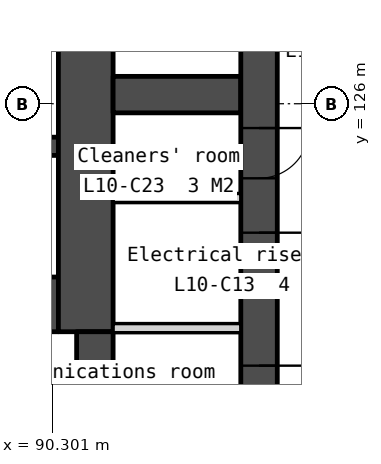
"""IFC4 building model, lengths in metres.
Left out: names, types, materials, properties, quantities, classifications, styles, units other than length and angle.
Written with IfcOpenShell. Run it as: python <this file> out.ifc"""

import sys

from ifc_helpers import new_model, si_unit, direction, frame, frame_2d, origin, place, context, subcontext, project, spatial, polyline, rectangle, outline, extrude, element, fill, save


model = new_model("IFC4")
c1 = context("Model", 3, precision=1e-05, world=origin(), true_north=direction((0.0, 1.0)))
c2 = subcontext(c1, "Body", "Model", "MODEL_VIEW")
j1 = project(units=[si_unit("LENGTHUNIT", "METRE"), si_unit("PLANEANGLEUNIT", "RADIAN")], contexts=[c1])
p1 = place(None, origin())
s1 = spatial("IfcSite", under=j1, at=p1, CompositionType="ELEMENT")
p2 = place(p1, origin())
s2 = spatial("IfcBuilding", under=s1, at=p2, CompositionType="ELEMENT")
p3 = place(p2, frame((0.0, 0.0, 49.0)))
s3 = spatial("IfcBuildingStorey", under=s2, at=p3, CompositionType="ELEMENT", Elevation=49.0)
p4 = place(p3, frame((87.85, 125.3, 0.0), z_axis=(0.0, 0.0, 1.0), x_axis=(1.0, 0.0, 0.0)))
e1 = element("IfcWall", 1, at=p4, inside=s3, PredefinedType="SOLIDWALL", context=c2, shape_type="SweptSolid", body=[
    extrude(rectangle(XDim=2.55, YDim=0.3, at=frame_2d((1.275, 0.0))), origin(), (0.0, 0.0, 1.0), 3.35),
])
p5 = place(p3, frame((87.85, 122.7, 0.0), z_axis=(0.0, 0.0, 1.0), x_axis=(1.0, 0.0, 0.0)))
e2 = element("IfcWall", 2, at=p5, inside=s3, PredefinedType="SOLIDWALL", context=c2, shape_type="SweptSolid", body=[
    extrude(rectangle(XDim=2.55, YDim=0.9, at=frame_2d((1.275, 0.0))), origin(), (0.0, 0.0, 1.0), 3.35),
])
p6 = place(p3, frame((90.85, 133.95, 0.0), z_axis=(0.0, 0.0, 1.0), x_axis=(0.0, -1.0, 0.0)))
e3 = element("IfcWall", 3, at=p6, inside=s3, PredefinedType="SOLIDWALL", context=c2, shape_type="SweptSolid", body=[
    extrude(rectangle(XDim=11.7, YDim=0.9, at=frame_2d((5.85, 0.0))), origin(), (0.0, 0.0, 1.0), 3.35),
])
p7 = place(p3, frame((91.0, 122.25, 0.0), z_axis=(0.0, 0.0, 1.0), x_axis=(0.0, -1.0, 0.0)))
e4 = element("IfcWall", 4, at=p7, inside=s3, PredefinedType="SOLIDWALL", context=c2, shape_type="SweptSolid", body=[
    extrude(rectangle(XDim=2.1, YDim=0.6, at=frame_2d((1.05, 0.0))), origin(), (0.0, 0.0, 1.0), 3.35),
])
p8 = place(p3, frame((91.3, 126.15, 0.0), z_axis=(0.0, 0.0, 1.0), x_axis=(1.0, 0.0, 0.0)))
e5 = element("IfcWall", 5, at=p8, inside=s3, PredefinedType="SOLIDWALL", context=c2, shape_type="SweptSolid", body=[
    extrude(rectangle(XDim=2.1, YDim=0.6, at=frame_2d((1.05, 0.0))), origin(), (0.0, 0.0, 1.0), 3.35),
])
for number, where, z_axis, x_axis in (
    (6, (91.3, 124.449, 0.0), (0.0, 0.0, 1.0), (1.0, 0.0, 0.0)),
    (7, (91.3, 122.309, 0.0), (0.0, 0.0, 1.0), (1.0, 0.0, 0.0)),
):
    element("IfcWall", number, at=place(p3, frame(where, z_axis=z_axis, x_axis=x_axis)), inside=s3, PredefinedType="PARTITIONING", context=c2, shape_type="SweptSolid", body=[
        extrude(rectangle(XDim=2.1, YDim=0.15, at=frame_2d((1.05, 0.0))), origin(), (0.0, 0.0, 1.0), 3.35),
    ])
p9 = place(p3, frame((93.7, 133.95, 0.0), z_axis=(0.0, 0.0, 1.0), x_axis=(0.0, -1.0, 0.0)))
e8 = element("IfcWall", 8, at=p9, inside=s3, PredefinedType="SOLIDWALL", context=c2, shape_type="SweptSolid", body=[
    extrude(rectangle(XDim=13.8, YDim=0.6, at=frame_2d((6.9, 0.0))), origin(), (0.0, 0.0, 1.0), 3.35),
])
p10 = place(p9, frame((0.6, 0.0, 0.0)))
e9 = element("IfcOpeningElement", 9, at=p10, cuts=e8, PredefinedType="OPENING", context=c2, shape_type="SweptSolid", body=[
    extrude(rectangle(XDim=1.1, YDim=2.1, at=frame_2d((0.55, 1.05))), frame((0.0, 0.31, 0.0), z_axis=(0.0, -1.0, 0.0), x_axis=(1.0, 0.0, 0.0)), (0.0, 0.0, 1.0), 0.62),
])
p11 = place(p9, frame((8.35, 0.0, 0.0)))
e10 = element("IfcOpeningElement", 10, at=p11, cuts=e8, PredefinedType="OPENING", context=c2, shape_type="SweptSolid", body=[
    extrude(rectangle(XDim=0.826, YDim=2.1, at=frame_2d((0.413, 1.05))), frame((0.0, 0.31, 0.0), z_axis=(0.0, -1.0, 0.0), x_axis=(1.0, 0.0, 0.0)), (0.0, 0.0, 1.0), 0.62),
])
p12 = place(p9, frame((10.071, 0.0, 0.0)))
e11 = element("IfcOpeningElement", 11, at=p12, cuts=e8, PredefinedType="OPENING", context=c2, shape_type="SweptSolid", body=[
    extrude(rectangle(XDim=1.0, YDim=2.1, at=frame_2d((0.5, 1.05))), frame((0.0, 0.31, 0.0), z_axis=(0.0, -1.0, 0.0), x_axis=(1.0, 0.0, 0.0)), (0.0, 0.0, 1.0), 0.62),
])
p13 = place(p9, frame((12.258, 0.0, 0.0)))
e12 = element("IfcOpeningElement", 12, at=p13, cuts=e8, PredefinedType="OPENING", context=c2, shape_type="SweptSolid", body=[
    extrude(rectangle(XDim=1.0, YDim=2.1, at=frame_2d((0.5, 1.05))), frame((0.0, 0.31, 0.0), z_axis=(0.0, -1.0, 0.0), x_axis=(1.0, 0.0, 0.0)), (0.0, 0.0, 1.0), 0.62),
])
p14 = place(p3, frame((83.105, 90.599, -0.15), z_axis=(0.0, 0.0, 1.0), x_axis=(0.499999201451, 0.866025864826, 0.0)))
e13 = element("IfcWall", 13, at=p14, inside=s3, PredefinedType="SOLIDWALL", context=c2, shape_type="SweptSolid", body=[
    extrude(outline(polyline([(44.8, 0.0), (44.8, 3.5), (0.0, 3.5), (0.0, 0.0), (44.8, 0.0)])), frame((0.0, 0.225, 0.0), z_axis=(0.0, -1.0, 0.0), x_axis=(1.0, 0.0, 0.0)), (0.0, 0.0, 1.0), 0.45),
])
p15 = place(p14, frame((2.43, 0.0, 1.05)))
e14 = element("IfcOpeningElement", 14, at=p15, cuts=e13, PredefinedType="OPENING", context=c2, shape_type="SweptSolid", body=[
    extrude(rectangle(XDim=1.8, YDim=1.5, at=frame_2d((0.9, 0.75))), frame((0.0, 0.235, 0.0), z_axis=(0.0, -1.0, 0.0), x_axis=(1.0, 0.0, 0.0)), (0.0, 0.0, 1.0), 0.47),
])
p16 = place(p14, frame((4.73, 0.0, 1.05)))
e15 = element("IfcOpeningElement", 15, at=p16, cuts=e13, PredefinedType="OPENING", context=c2, shape_type="SweptSolid", body=[
    extrude(rectangle(XDim=1.8, YDim=1.5, at=frame_2d((0.9, 0.75))), frame((0.0, 0.235, 0.0), z_axis=(0.0, -1.0, 0.0), x_axis=(1.0, 0.0, 0.0)), (0.0, 0.0, 1.0), 0.47),
])
p17 = place(p14, frame((11.39, 0.0, 1.05)))
e16 = element("IfcOpeningElement", 16, at=p17, cuts=e13, PredefinedType="OPENING", context=c2, shape_type="SweptSolid", body=[
    extrude(rectangle(XDim=1.8, YDim=1.5, at=frame_2d((0.9, 0.75))), frame((0.0, 0.235, 0.0), z_axis=(0.0, -1.0, 0.0), x_axis=(1.0, 0.0, 0.0)), (0.0, 0.0, 1.0), 0.47),
])
p18 = place(p14, frame((13.69, 0.0, 1.05)))
e17 = element("IfcOpeningElement", 17, at=p18, cuts=e13, PredefinedType="OPENING", context=c2, shape_type="SweptSolid", body=[
    extrude(rectangle(XDim=1.8, YDim=1.5, at=frame_2d((0.9, 0.75))), frame((0.0, 0.235, 0.0), z_axis=(0.0, -1.0, 0.0), x_axis=(1.0, 0.0, 0.0)), (0.0, 0.0, 1.0), 0.47),
])
p19 = place(p14, frame((20.35, 0.0, 1.05)))
e18 = element("IfcOpeningElement", 18, at=p19, cuts=e13, PredefinedType="OPENING", context=c2, shape_type="SweptSolid", body=[
    extrude(rectangle(XDim=1.8, YDim=1.5, at=frame_2d((0.9, 0.75))), frame((0.0, 0.235, 0.0), z_axis=(0.0, -1.0, 0.0), x_axis=(1.0, 0.0, 0.0)), (0.0, 0.0, 1.0), 0.47),
])
p20 = place(p14, frame((22.65, 0.0, 1.05)))
e19 = element("IfcOpeningElement", 19, at=p20, cuts=e13, PredefinedType="OPENING", context=c2, shape_type="SweptSolid", body=[
    extrude(rectangle(XDim=1.8, YDim=1.5, at=frame_2d((0.9, 0.75))), frame((0.0, 0.235, 0.0), z_axis=(0.0, -1.0, 0.0), x_axis=(1.0, 0.0, 0.0)), (0.0, 0.0, 1.0), 0.47),
])
p21 = place(p14, frame((29.31, 0.0, 1.05)))
e20 = element("IfcOpeningElement", 20, at=p21, cuts=e13, PredefinedType="OPENING", context=c2, shape_type="SweptSolid", body=[
    extrude(rectangle(XDim=1.8, YDim=1.5, at=frame_2d((0.9, 0.75))), frame((0.0, 0.235, 0.0), z_axis=(0.0, -1.0, 0.0), x_axis=(1.0, 0.0, 0.0)), (0.0, 0.0, 1.0), 0.47),
])
p22 = place(p14, frame((31.61, 0.0, 1.05)))
e21 = element("IfcOpeningElement", 21, at=p22, cuts=e13, PredefinedType="OPENING", context=c2, shape_type="SweptSolid", body=[
    extrude(rectangle(XDim=1.8, YDim=1.5, at=frame_2d((0.9, 0.75))), frame((0.0, 0.235, 0.0), z_axis=(0.0, -1.0, 0.0), x_axis=(1.0, 0.0, 0.0)), (0.0, 0.0, 1.0), 0.47),
])
p23 = place(p14, frame((38.27, 0.0, 1.05)))
e22 = element("IfcOpeningElement", 22, at=p23, cuts=e13, PredefinedType="OPENING", context=c2, shape_type="SweptSolid", body=[
    extrude(rectangle(XDim=1.8, YDim=1.5, at=frame_2d((0.9, 0.75))), frame((0.0, 0.235, 0.0), z_axis=(0.0, -1.0, 0.0), x_axis=(1.0, 0.0, 0.0)), (0.0, 0.0, 1.0), 0.47),
])
p24 = place(p14, frame((40.57, 0.0, 1.05)))
e23 = element("IfcOpeningElement", 23, at=p24, cuts=e13, PredefinedType="OPENING", context=c2, shape_type="SweptSolid", body=[
    extrude(rectangle(XDim=1.8, YDim=1.5, at=frame_2d((0.9, 0.75))), frame((0.0, 0.235, 0.0), z_axis=(0.0, -1.0, 0.0), x_axis=(1.0, 0.0, 0.0)), (0.0, 0.0, 1.0), 0.47),
])
p25 = place(p11, origin())
e24 = element("IfcDoor", 24, at=p25, inside=s3, OperationType="SINGLE_SWING_LEFT", PredefinedType="DOOR", context=c2, shape_type="SweptSolid", body=[
    extrude(rectangle(XDim=0.826, YDim=2.1, at=frame_2d((0.413, 1.05))), frame((0.0, 0.025, 0.0), z_axis=(0.0, -1.0, 0.0), x_axis=(1.0, 0.0, 0.0)), (0.0, 0.0, 1.0), 0.05),
])
fill(e10, e24)
p26 = place(p12, origin())
e25 = element("IfcDoor", 25, at=p26, inside=s3, OperationType="SINGLE_SWING_LEFT", PredefinedType="DOOR", context=c2, shape_type="SweptSolid", body=[
    extrude(rectangle(XDim=1.0, YDim=2.1, at=frame_2d((0.5, 1.05))), frame((0.0, 0.025, 0.0), z_axis=(0.0, -1.0, 0.0), x_axis=(1.0, 0.0, 0.0)), (0.0, 0.0, 1.0), 0.05),
])
fill(e11, e25)
p27 = place(p13, origin())
e26 = element("IfcDoor", 26, at=p27, inside=s3, OperationType="SINGLE_SWING_LEFT", PredefinedType="DOOR", context=c2, shape_type="SweptSolid", body=[
    extrude(rectangle(XDim=1.0, YDim=2.1, at=frame_2d((0.5, 1.05))), frame((0.0, 0.025, 0.0), z_axis=(0.0, -1.0, 0.0), x_axis=(1.0, 0.0, 0.0)), (0.0, 0.0, 1.0), 0.05),
])
fill(e12, e26)
save(model, sys.argv[1])
